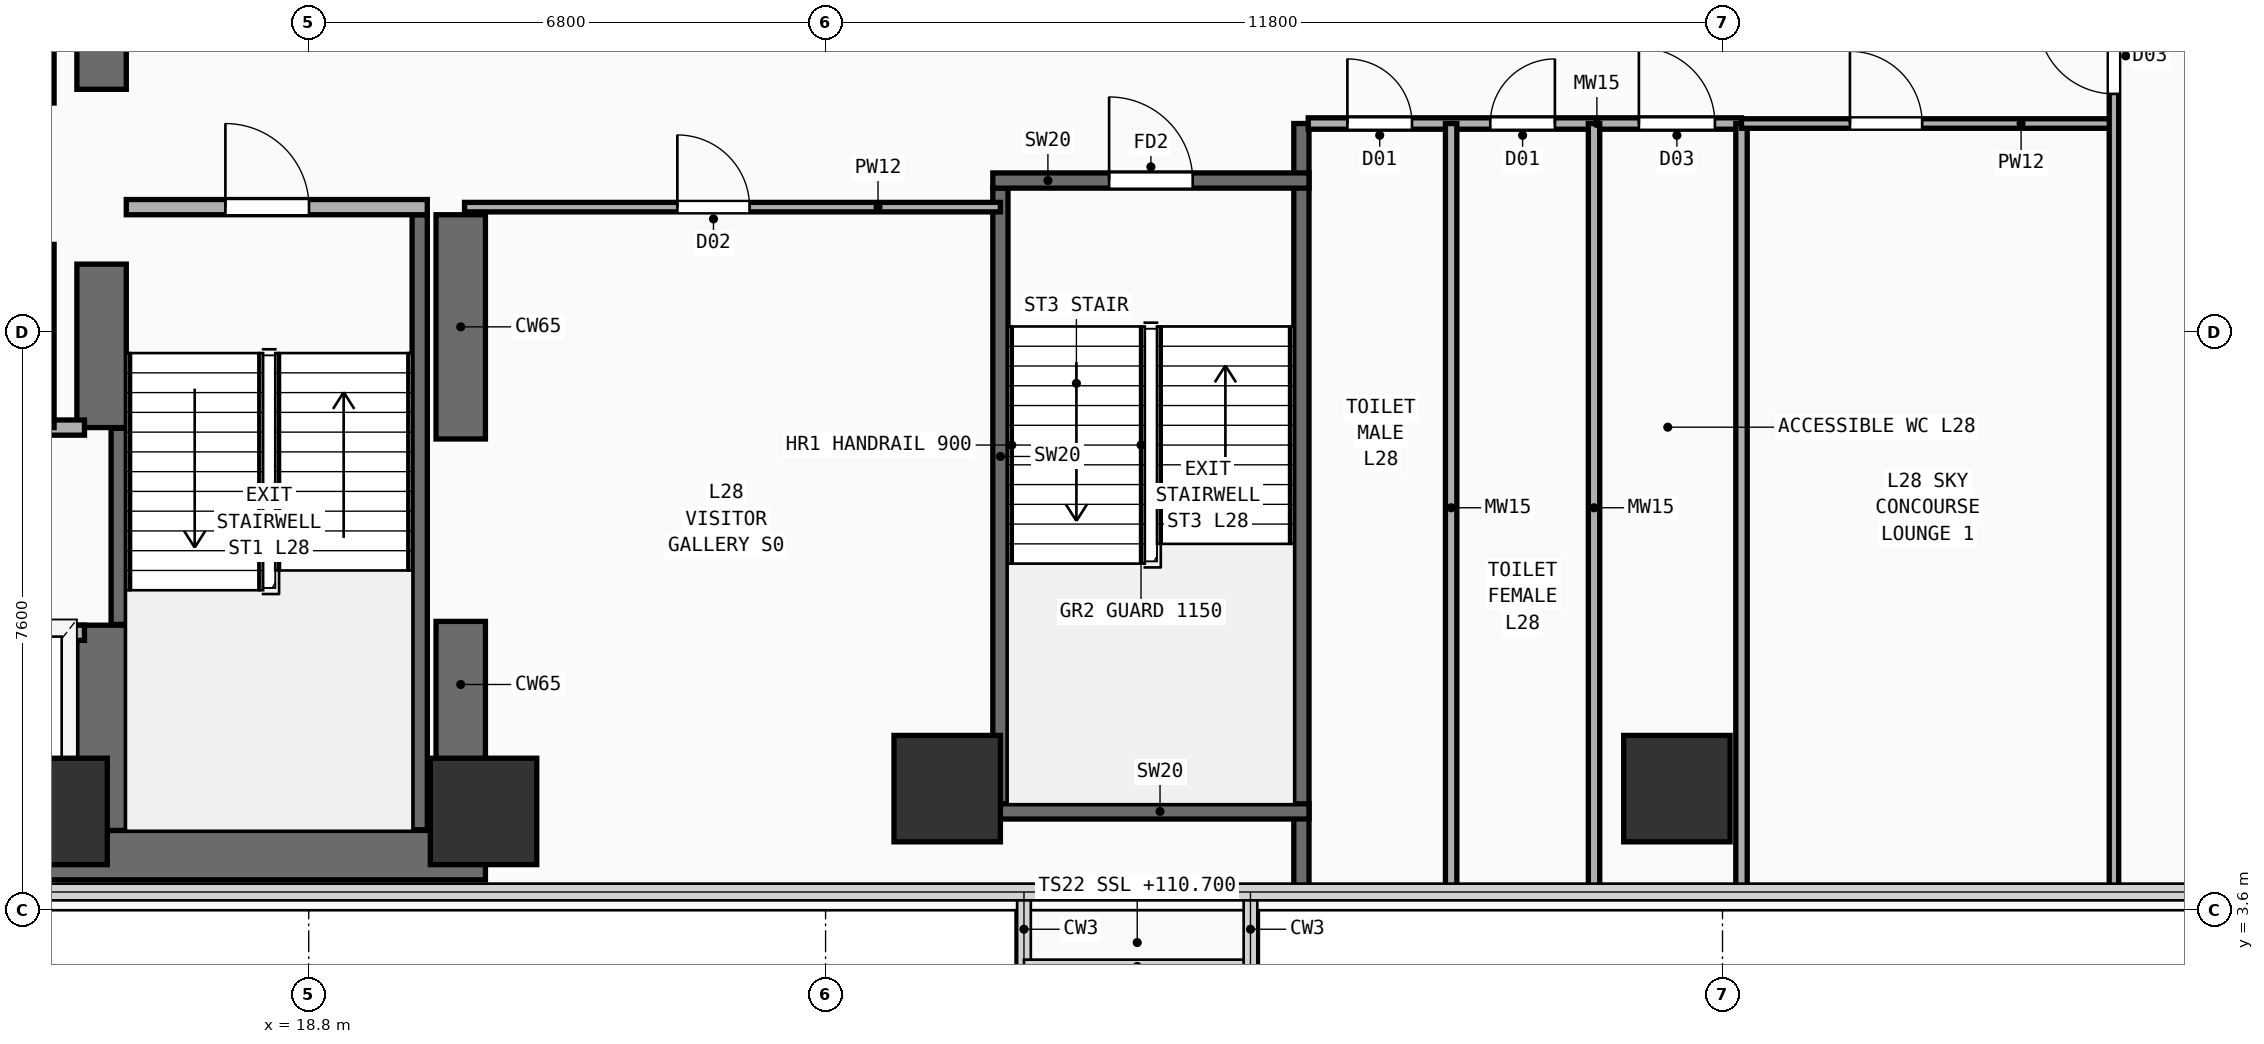
"""IFC4 building model, lengths in metres.
Left out: names, types, materials, properties, quantities, classifications, styles, units other than length and angle.
Written with IfcOpenShell. Run it as: python <this file> out.ifc"""

import sys

from ifc_helpers import new_model, si_unit, direction, frame, frame_2d, origin, origin_2d, place, context, subcontext, project, spatial, rectangle, extrude, element, fill, save


model = new_model("IFC4")
c1 = context("Model", 3, precision=1e-05, world=origin(), true_north=direction((0.0, 1.0)))
c2 = subcontext(c1, "Body", "Model", "MODEL_VIEW")
j1 = project(units=[si_unit("LENGTHUNIT", "METRE"), si_unit("PLANEANGLEUNIT", "RADIAN")], contexts=[c1])
p1 = place(None, origin())
s1 = spatial("IfcSite", under=j1, at=p1, CompositionType="ELEMENT")
p2 = place(p1, origin())
s2 = spatial("IfcBuilding", under=s1, at=p2, CompositionType="ELEMENT")
p3 = place(p2, frame((0.0, 0.0, 110.7)))
s3 = spatial("IfcBuildingStorey", under=s2, at=p3, CompositionType="ELEMENT", Elevation=110.7)
p4 = place(p3, frame((7.125, 4.325, 0.0), z_axis=(0.0, 0.0, 1.0), x_axis=(1.0, 0.0, 0.0)))
e1 = element("IfcWall", 1, at=p4, inside=s3, PredefinedType="SHEAR", context=c2, shape_type="SweptSolid", body=[
    extrude(rectangle(XDim=14.0, YDim=0.65, at=frame_2d((7.0, 0.0))), origin(), (0.0, 0.0, 1.0), 3.54),
])
p5 = place(p3, frame((20.8, 4.65, 0.0), z_axis=(0.0, 0.0, 1.0), x_axis=(0.0, 1.0, 0.0)))
e2 = element("IfcWall", 2, at=p5, inside=s3, PredefinedType="SHEAR", context=c2, shape_type="SweptSolid", body=[
    extrude(rectangle(XDim=2.75, YDim=0.65, at=frame_2d((1.375, 0.0))), origin(), (0.0, 0.0, 1.0), 3.54),
])
p6 = place(p3, frame((20.8, 9.8, 0.0), z_axis=(0.0, 0.0, 1.0), x_axis=(0.0, 1.0, 0.0)))
e3 = element("IfcWall", 3, at=p6, inside=s3, PredefinedType="SHEAR", context=c2, shape_type="SweptSolid", body=[
    extrude(rectangle(XDim=2.95, YDim=0.65, at=frame_2d((1.475, 0.0))), origin(), (0.0, 0.0, 1.0), 3.54),
])
p7 = place(p3, frame((16.075, 4.65, 0.0), z_axis=(0.0, 0.0, 1.0), x_axis=(0.0, 1.0, 0.0)))
e4 = element("IfcWall", 4, at=p7, inside=s3, PredefinedType="SHEAR", context=c2, shape_type="SweptSolid", body=[
    extrude(rectangle(XDim=2.7, YDim=0.65, at=frame_2d((1.35, 0.0))), origin(), (0.0, 0.0, 1.0), 3.54),
])
p8 = place(p3, frame((16.075, 9.95, 0.0), z_axis=(0.0, 0.0, 1.0), x_axis=(0.0, 1.0, 0.0)))
e5 = element("IfcWall", 5, at=p8, inside=s3, PredefinedType="SHEAR", context=c2, shape_type="SweptSolid", body=[
    extrude(rectangle(XDim=2.15, YDim=0.65, at=frame_2d((1.075, 0.0))), origin(), (0.0, 0.0, 1.0), 3.54),
])
p9 = place(p3, frame((16.075, 14.4, 0.0), z_axis=(0.0, 0.0, 1.0), x_axis=(0.0, 1.0, 0.0)))
e6 = element("IfcWall", 6, at=p9, inside=s3, PredefinedType="SHEAR", context=c2, shape_type="SweptSolid", body=[
    extrude(rectangle(XDim=9.1, YDim=0.65, at=frame_2d((4.55, 0.0))), origin(), (0.0, 0.0, 1.0), 3.54),
])
for number, where, z_axis, x_axis in (
    (7, (15.45, 4.9, 0.0), (0.0, 0.0, 1.0), (1.0, 0.0, 0.0)),
    (8, (21.1, 4.9, 0.0), (0.0, 0.0, 1.0), (1.0, 0.0, 0.0)),
    (9, (27.2, 5.2, 0.0), (0.0, 0.0, 1.0), (1.0, 0.0, 0.0)),
    (10, (36.8, 5.2, 0.0), (0.0, 0.0, 1.0), (1.0, 0.0, 0.0)),
):
    element("IfcColumn", number, at=place(p3, frame(where, z_axis=z_axis, x_axis=x_axis)), inside=s3, PredefinedType="COLUMN", context=c2, shape_type="SweptSolid", body=[
        extrude(rectangle(XDim=1.4, YDim=1.4, at=origin_2d()), origin(), (0.0, 0.0, 1.0), 3.54),
    ])
p10 = place(p3, frame((16.3, 7.36, 0.0), z_axis=(0.0, 0.0, 1.0), x_axis=(0.0, 1.0, 0.0)))
e11 = element("IfcWall", 11, at=p10, inside=s3, PredefinedType="SHEAR", context=c2, shape_type="SweptSolid", body=[
    extrude(rectangle(XDim=2.58, YDim=0.2, at=frame_2d((1.29, 0.0))), origin(), (0.0, 0.0, 1.0), 3.54),
])
p11 = place(p3, frame((20.26, 4.66, 0.0), z_axis=(0.0, 0.0, 1.0), x_axis=(0.0, 1.0, 0.0)))
e12 = element("IfcWall", 12, at=p11, inside=s3, PredefinedType="SHEAR", context=c2, shape_type="SweptSolid", body=[
    extrude(rectangle(XDim=8.09, YDim=0.2, at=frame_2d((4.045, 0.0))), origin(), (0.0, 0.0, 1.0), 3.54),
])
p12 = place(p3, frame((16.4, 12.85, 0.0), z_axis=(0.0, 0.0, 1.0), x_axis=(1.0, 0.0, 0.0)))
e13 = element("IfcWall", 13, at=p12, inside=s3, PredefinedType="PARTITIONING", context=c2, shape_type="SweptSolid", body=[
    extrude(rectangle(XDim=3.96, YDim=0.2, at=frame_2d((1.98, 0.0))), origin(), (0.0, 0.0, 1.0), 3.54),
])
p13 = place(p12, frame((1.304, 0.0, 0.0)))
e14 = element("IfcOpeningElement", 14, at=p13, cuts=e13, PredefinedType="OPENING", context=c2, shape_type="SweptSolid", body=[
    extrude(rectangle(XDim=1.1, YDim=2.2, at=frame_2d((0.55, 1.1))), frame((0.0, 0.11, 0.0), z_axis=(0.0, -1.0, 0.0), x_axis=(1.0, 0.0, 0.0)), (0.0, 0.0, 1.0), 0.22),
])
p14 = place(p3, frame((27.9, 5.0, 0.0), z_axis=(0.0, 0.0, 1.0), x_axis=(0.0, 1.0, 0.0)))
e15 = element("IfcWall", 15, at=p14, inside=s3, PredefinedType="SHEAR", context=c2, shape_type="SweptSolid", body=[
    extrude(rectangle(XDim=8.1, YDim=0.2, at=frame_2d((4.05, 0.0))), origin(), (0.0, 0.0, 1.0), 3.54),
])
p15 = place(p3, frame((31.86, 3.84, 0.0), z_axis=(0.0, 0.0, 1.0), x_axis=(0.0, 1.0, 0.0)))
e16 = element("IfcWall", 16, at=p15, inside=s3, PredefinedType="SHEAR", context=c2, shape_type="SweptSolid", body=[
    extrude(rectangle(XDim=10.11, YDim=0.2, at=frame_2d((5.055, 0.0))), origin(), (0.0, 0.0, 1.0), 3.54),
])
p16 = place(p3, frame((27.8, 4.9, 0.0), z_axis=(0.0, 0.0, 1.0), x_axis=(1.0, 0.0, 0.0)))
e17 = element("IfcWall", 17, at=p16, inside=s3, PredefinedType="SHEAR", context=c2, shape_type="SweptSolid", body=[
    extrude(rectangle(XDim=4.16, YDim=0.2, at=frame_2d((2.08, 0.0))), origin(), (0.0, 0.0, 1.0), 3.54),
])
p17 = place(p3, frame((27.8, 13.2, 0.0), z_axis=(0.0, 0.0, 1.0), x_axis=(1.0, 0.0, 0.0)))
e18 = element("IfcWall", 18, at=p17, inside=s3, PredefinedType="SHEAR", context=c2, shape_type="SweptSolid", body=[
    extrude(rectangle(XDim=4.16, YDim=0.2, at=frame_2d((2.08, 0.0))), origin(), (0.0, 0.0, 1.0), 3.54),
])
p18 = place(p17, frame((1.53, 0.0, 0.0)))
e19 = element("IfcOpeningElement", 19, at=p18, cuts=e18, PredefinedType="OPENING", context=c2, shape_type="SweptSolid", body=[
    extrude(rectangle(XDim=1.1, YDim=2.2, at=frame_2d((0.55, 1.1))), frame((0.0, 0.11, 0.0), z_axis=(0.0, -1.0, 0.0), x_axis=(1.0, 0.0, 0.0)), (0.0, 0.0, 1.0), 0.22),
])
p19 = place(p3, frame((7.5, 7.25, 0.0), z_axis=(0.0, 0.0, 1.0), x_axis=(1.0, 0.0, 0.0)))
e20 = element("IfcWall", 20, at=p19, inside=s3, PredefinedType="PARTITIONING", context=c2, shape_type="SweptSolid", body=[
    extrude(rectangle(XDim=8.35, YDim=0.2, at=frame_2d((4.175, 0.0))), origin(), (0.0, 0.0, 1.0), 3.54),
])
p20 = place(p19, frame((0.53, 0.0, 0.0)))
e21 = element("IfcOpeningElement", 21, at=p20, cuts=e20, PredefinedType="OPENING", context=c2, shape_type="SweptSolid", body=[
    extrude(rectangle(XDim=1.1, YDim=2.2, at=frame_2d((0.55, 1.1))), frame((0.0, 0.11, 0.0), z_axis=(0.0, -1.0, 0.0), x_axis=(1.0, 0.0, 0.0)), (0.0, 0.0, 1.0), 0.22),
])
p21 = place(p19, frame((2.37, 0.0, 0.0)))
e22 = element("IfcOpeningElement", 22, at=p21, cuts=e20, PredefinedType="OPENING", context=c2, shape_type="SweptSolid", body=[
    extrude(rectangle(XDim=1.1, YDim=2.2, at=frame_2d((0.55, 1.1))), frame((0.0, 0.11, 0.0), z_axis=(0.0, -1.0, 0.0), x_axis=(1.0, 0.0, 0.0)), (0.0, 0.0, 1.0), 0.22),
])
p22 = place(p19, frame((4.33, 0.0, 0.0)))
e23 = element("IfcOpeningElement", 23, at=p22, cuts=e20, PredefinedType="OPENING", context=c2, shape_type="SweptSolid", body=[
    extrude(rectangle(XDim=1.1, YDim=2.2, at=frame_2d((0.55, 1.1))), frame((0.0, 0.11, 0.0), z_axis=(0.0, -1.0, 0.0), x_axis=(1.0, 0.0, 0.0)), (0.0, 0.0, 1.0), 0.22),
])
p23 = place(p19, frame((6.5, 0.0, 0.0)))
e24 = element("IfcOpeningElement", 24, at=p23, cuts=e20, PredefinedType="OPENING", context=c2, shape_type="SweptSolid", body=[
    extrude(rectangle(XDim=1.1, YDim=2.2, at=frame_2d((0.55, 1.1))), frame((0.0, 0.11, 0.0), z_axis=(0.0, -1.0, 0.0), x_axis=(1.0, 0.0, 0.0)), (0.0, 0.0, 1.0), 0.22),
])
p24 = place(p3, frame((7.5, 9.95, 0.0), z_axis=(0.0, 0.0, 1.0), x_axis=(1.0, 0.0, 0.0)))
e25 = element("IfcWall", 25, at=p24, inside=s3, PredefinedType="PARTITIONING", context=c2, shape_type="SweptSolid", body=[
    extrude(rectangle(XDim=8.35, YDim=0.2, at=frame_2d((4.175, 0.0))), origin(), (0.0, 0.0, 1.0), 3.54),
])
p25 = place(p3, frame((15.35, 9.95, 0.0), z_axis=(0.0, 0.0, 1.0), x_axis=(0.0, 1.0, 0.0)))
e26 = element("IfcWall", 26, at=p25, inside=s3, PredefinedType="PARTITIONING", context=c2, shape_type="SweptSolid", body=[
    extrude(rectangle(XDim=2.41, YDim=0.2, at=frame_2d((1.205, 0.0))), origin(), (0.0, 0.0, 1.0), 3.54),
])
p26 = place(p3, frame((15.35, 14.22, 0.0), z_axis=(0.0, 0.0, 1.0), x_axis=(0.0, 1.0, 0.0)))
e27 = element("IfcWall", 27, at=p26, inside=s3, PredefinedType="PARTITIONING", context=c2, shape_type="SweptSolid", body=[
    extrude(rectangle(XDim=2.23, YDim=0.2, at=frame_2d((1.115, 0.0))), origin(), (0.0, 0.0, 1.0), 3.54),
])
p27 = place(p3, frame((31.95, 13.95, 0.0), z_axis=(0.0, 0.0, 1.0), x_axis=(1.0, 0.0, 0.0)))
e28 = element("IfcWall", 28, at=p27, inside=s3, PredefinedType="PLUMBINGWALL", context=c2, shape_type="SweptSolid", body=[
    extrude(rectangle(XDim=5.7, YDim=0.15, at=frame_2d((2.85, 0.0))), origin(), (0.0, 0.0, 1.0), 3.54),
])
p28 = place(p27, frame((0.515, 0.0, 0.0)))
e29 = element("IfcOpeningElement", 29, at=p28, cuts=e28, PredefinedType="OPENING", context=c2, shape_type="SweptSolid", body=[
    extrude(rectangle(XDim=0.85, YDim=2.15, at=frame_2d((0.425, 1.075))), frame((0.0, 0.085, 0.0), z_axis=(0.0, -1.0, 0.0), x_axis=(1.0, 0.0, 0.0)), (0.0, 0.0, 1.0), 0.17),
])
p29 = place(p27, frame((2.395, 0.0, 0.0)))
e30 = element("IfcOpeningElement", 30, at=p29, cuts=e28, PredefinedType="OPENING", context=c2, shape_type="SweptSolid", body=[
    extrude(rectangle(XDim=0.85, YDim=2.15, at=frame_2d((0.425, 1.075))), frame((0.0, 0.085, 0.0), z_axis=(0.0, -1.0, 0.0), x_axis=(1.0, 0.0, 0.0)), (0.0, 0.0, 1.0), 0.17),
])
p30 = place(p27, frame((4.35, 0.0, 0.0)))
e31 = element("IfcOpeningElement", 31, at=p30, cuts=e28, PredefinedType="OPENING", context=c2, shape_type="SweptSolid", body=[
    extrude(rectangle(XDim=1.0, YDim=2.2, at=frame_2d((0.5, 1.1))), frame((0.0, 0.085, 0.0), z_axis=(0.0, -1.0, 0.0), x_axis=(1.0, 0.0, 0.0)), (0.0, 0.0, 1.0), 0.17),
])
for number, where, z_axis, x_axis in (
    (32, (33.83, 3.84, 0.0), (0.0, 0.0, 1.0), (0.0, 1.0, 0.0)),
    (33, (35.71, 3.84, 0.0), (0.0, 0.0, 1.0), (0.0, 1.0, 0.0)),
    (34, (37.65, 3.84, 0.0), (0.0, 0.0, 1.0), (0.0, 1.0, 0.0)),
):
    element("IfcWall", number, at=place(p3, frame(where, z_axis=z_axis, x_axis=x_axis)), inside=s3, PredefinedType="PLUMBINGWALL", context=c2, shape_type="SweptSolid", body=[
        extrude(rectangle(XDim=10.11, YDim=0.15, at=frame_2d((5.055, 0.0))), origin(), (0.0, 0.0, 1.0), 3.54),
    ])
p31 = place(p3, frame((20.85, 12.85, 0.0), z_axis=(0.0, 0.0, 1.0), x_axis=(1.0, 0.0, 0.0)))
e35 = element("IfcWall", 35, at=p31, inside=s3, PredefinedType="PARTITIONING", context=c2, shape_type="SweptSolid", body=[
    extrude(rectangle(XDim=7.05, YDim=0.125, at=frame_2d((3.525, 0.0))), origin(), (0.0, 0.0, 1.0), 3.54),
])
p32 = place(p31, frame((2.8, 0.0, 0.0)))
e36 = element("IfcOpeningElement", 36, at=p32, cuts=e35, PredefinedType="OPENING", context=c2, shape_type="SweptSolid", body=[
    extrude(rectangle(XDim=0.95, YDim=2.15, at=frame_2d((0.475, 1.075))), frame((0.0, 0.073, 0.0), z_axis=(0.0, -1.0, 0.0), x_axis=(1.0, 0.0, 0.0)), (0.0, 0.0, 1.0), 0.145),
])
p33 = place(p3, frame((37.65, 13.95, 0.0), z_axis=(0.0, 0.0, 1.0), x_axis=(1.0, 0.0, 0.0)))
e37 = element("IfcWall", 37, at=p33, inside=s3, PredefinedType="PARTITIONING", context=c2, shape_type="SweptSolid", body=[
    extrude(rectangle(XDim=4.9, YDim=0.125, at=frame_2d((2.45, 0.0))), origin(), (0.0, 0.0, 1.0), 3.54),
])
p34 = place(p33, frame((1.427, 0.0, 0.0)))
e38 = element("IfcOpeningElement", 38, at=p34, cuts=e37, PredefinedType="OPENING", context=c2, shape_type="SweptSolid", body=[
    extrude(rectangle(XDim=0.95, YDim=2.15, at=frame_2d((0.475, 1.075))), frame((0.0, 0.073, 0.0), z_axis=(0.0, -1.0, 0.0), x_axis=(1.0, 0.0, 0.0)), (0.0, 0.0, 1.0), 0.145),
])
p35 = place(p3, frame((42.55, 3.84, 0.0), z_axis=(0.0, 0.0, 1.0), x_axis=(0.0, 1.0, 0.0)))
e39 = element("IfcWall", 39, at=p35, inside=s3, PredefinedType="PARTITIONING", context=c2, shape_type="SweptSolid", body=[
    extrude(rectangle(XDim=20.12, YDim=0.125, at=frame_2d((10.06, 0.0))), origin(), (0.0, 0.0, 1.0), 3.54),
])
p36 = place(p35, frame((10.5, 0.0, 0.0)))
e40 = element("IfcOpeningElement", 40, at=p36, cuts=e39, PredefinedType="OPENING", context=c2, shape_type="SweptSolid", body=[
    extrude(rectangle(XDim=1.0, YDim=2.2, at=frame_2d((0.5, 1.1))), frame((0.0, 0.073, 0.0), z_axis=(0.0, -1.0, 0.0), x_axis=(1.0, 0.0, 0.0)), (0.0, 0.0, 1.0), 0.145),
])
p37 = place(p13, frame((1.1, 0.0, 0.0), z_axis=(0.0, 0.0, 1.0), x_axis=(-1.0, 0.0, 0.0)))
e41 = element("IfcDoor", 41, at=p37, inside=s3, OperationType="SINGLE_SWING_RIGHT", PredefinedType="DOOR", context=c2, shape_type="SweptSolid", body=[
    extrude(rectangle(XDim=1.1, YDim=2.2, at=frame_2d((0.55, 1.1))), frame((0.0, 0.025, 0.0), z_axis=(0.0, -1.0, 0.0), x_axis=(1.0, 0.0, 0.0)), (0.0, 0.0, 1.0), 0.05),
])
fill(e14, e41)
p38 = place(p18, frame((1.1, 0.0, 0.0), z_axis=(0.0, 0.0, 1.0), x_axis=(-1.0, 0.0, 0.0)))
e42 = element("IfcDoor", 42, at=p38, inside=s3, OperationType="SINGLE_SWING_RIGHT", PredefinedType="DOOR", context=c2, shape_type="SweptSolid", body=[
    extrude(rectangle(XDim=1.1, YDim=2.2, at=frame_2d((0.55, 1.1))), frame((0.0, 0.025, 0.0), z_axis=(0.0, -1.0, 0.0), x_axis=(1.0, 0.0, 0.0)), (0.0, 0.0, 1.0), 0.05),
])
fill(e19, e42)
p39 = place(p28, origin())
e43 = element("IfcDoor", 43, at=p39, inside=s3, OperationType="SINGLE_SWING_LEFT", PredefinedType="DOOR", context=c2, shape_type="SweptSolid", body=[
    extrude(rectangle(XDim=0.85, YDim=2.15, at=frame_2d((0.425, 1.075))), frame((0.0, 0.025, 0.0), z_axis=(0.0, -1.0, 0.0), x_axis=(1.0, 0.0, 0.0)), (0.0, 0.0, 1.0), 0.05),
])
fill(e29, e43)
p40 = place(p29, origin())
e44 = element("IfcDoor", 44, at=p40, inside=s3, OperationType="SINGLE_SWING_RIGHT", PredefinedType="DOOR", context=c2, shape_type="SweptSolid", body=[
    extrude(rectangle(XDim=0.85, YDim=2.15, at=frame_2d((0.425, 1.075))), frame((0.0, 0.025, 0.0), z_axis=(0.0, -1.0, 0.0), x_axis=(1.0, 0.0, 0.0)), (0.0, 0.0, 1.0), 0.05),
])
fill(e30, e44)
p41 = place(p30, origin())
e45 = element("IfcDoor", 45, at=p41, inside=s3, OperationType="SINGLE_SWING_LEFT", PredefinedType="DOOR", context=c2, shape_type="SweptSolid", body=[
    extrude(rectangle(XDim=1.0, YDim=2.2, at=frame_2d((0.5, 1.1))), frame((0.0, 0.025, 0.0), z_axis=(0.0, -1.0, 0.0), x_axis=(1.0, 0.0, 0.0)), (0.0, 0.0, 1.0), 0.05),
])
fill(e31, e45)
p42 = place(p32, origin())
e46 = element("IfcDoor", 46, at=p42, inside=s3, OperationType="SINGLE_SWING_LEFT", PredefinedType="DOOR", context=c2, shape_type="SweptSolid", body=[
    extrude(rectangle(XDim=0.95, YDim=2.15, at=frame_2d((0.475, 1.075))), frame((0.0, 0.025, 0.0), z_axis=(0.0, -1.0, 0.0), x_axis=(1.0, 0.0, 0.0)), (0.0, 0.0, 1.0), 0.05),
])
fill(e36, e46)
p43 = place(p34, origin())
e47 = element("IfcDoor", 47, at=p43, inside=s3, OperationType="SINGLE_SWING_LEFT", PredefinedType="DOOR", context=c2, shape_type="SweptSolid", body=[
    extrude(rectangle(XDim=0.95, YDim=2.15, at=frame_2d((0.475, 1.075))), frame((0.0, 0.025, 0.0), z_axis=(0.0, -1.0, 0.0), x_axis=(1.0, 0.0, 0.0)), (0.0, 0.0, 1.0), 0.05),
])
fill(e38, e47)
p44 = place(p36, origin())
e48 = element("IfcDoor", 48, at=p44, inside=s3, OperationType="SINGLE_SWING_RIGHT", PredefinedType="DOOR", context=c2, shape_type="SweptSolid", body=[
    extrude(rectangle(XDim=1.0, YDim=2.2, at=frame_2d((0.5, 1.1))), frame((0.0, 0.025, 0.0), z_axis=(0.0, -1.0, 0.0), x_axis=(1.0, 0.0, 0.0)), (0.0, 0.0, 1.0), 0.05),
])
fill(e40, e48)
save(model, sys.argv[1])
